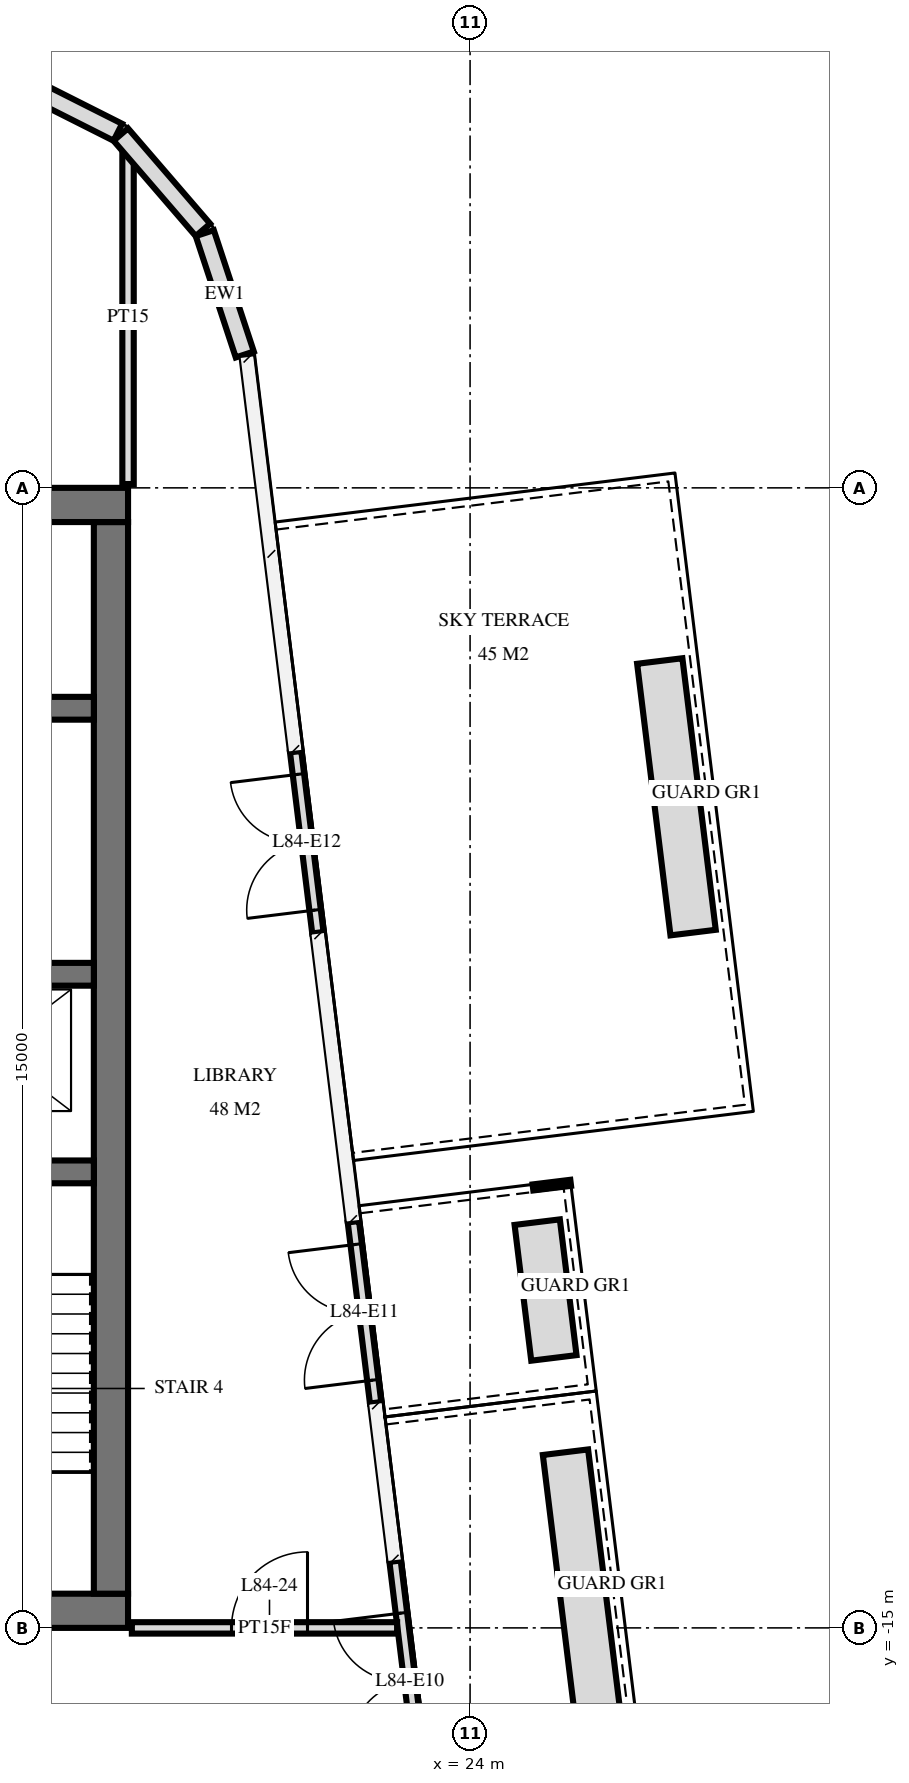
"""IFC4 building model, lengths in metres.
Left out: names, types, materials, properties, quantities, classifications, styles, units other than length and angle.
Written with IfcOpenShell. Run it as: python <this file> out.ifc"""

import sys

from ifc_helpers import new_model, si_unit, direction, frame, frame_2d, origin, place, context, subcontext, project, spatial, rectangle, extrude, element, fill, save


model = new_model("IFC4")
c1 = context("Model", 3, precision=1e-05, world=origin(), true_north=direction((0.0, 1.0)))
c2 = subcontext(c1, "Body", "Model", "MODEL_VIEW")
j1 = project(units=[si_unit("LENGTHUNIT", "METRE"), si_unit("PLANEANGLEUNIT", "RADIAN")], contexts=[c1])
p1 = place(None, origin())
s1 = spatial("IfcSite", under=j1, at=p1, CompositionType="ELEMENT")
p2 = place(p1, origin())
s2 = spatial("IfcBuilding", under=s1, at=p2, CompositionType="ELEMENT")
p3 = place(p2, frame((0.0, 0.0, 318.6)))
s3 = spatial("IfcBuildingStorey", under=s2, at=p3, CompositionType="ELEMENT", Elevation=318.6)
p4 = place(p3, frame((10.0, -0.225, 0.0), z_axis=(0.0, 0.0, 1.0), x_axis=(1.0, 0.0, 0.0)))
e1 = element("IfcWall", 1, at=p4, inside=s3, PredefinedType="SHEAR", context=c2, shape_type="SweptSolid", body=[
    extrude(rectangle(XDim=9.5, YDim=0.45, at=frame_2d((4.75, 0.0))), origin(), (0.0, 0.0, 1.0), 4.0),
])
p5 = place(p3, frame((10.0, -14.775, 0.0), z_axis=(0.0, 0.0, 1.0), x_axis=(1.0, 0.0, 0.0)))
e2 = element("IfcWall", 2, at=p5, inside=s3, PredefinedType="SHEAR", context=c2, shape_type="SweptSolid", body=[
    extrude(rectangle(XDim=9.5, YDim=0.45, at=frame_2d((4.75, 0.0))), origin(), (0.0, 0.0, 1.0), 4.0),
])
p6 = place(p5, frame((7.1, 0.0, 0.0)))
e3 = element("IfcOpeningElement", 3, at=p6, cuts=e2, PredefinedType="OPENING", context=c2, shape_type="SweptSolid", body=[
    extrude(rectangle(XDim=1.2, YDim=2.1, at=frame_2d((0.6, 1.05))), frame((0.0, 0.235, 0.0), z_axis=(0.0, -1.0, 0.0), x_axis=(1.0, 0.0, 0.0)), (0.0, 0.0, 1.0), 0.47),
])
p7 = place(p5, frame((4.15, 0.0, 0.0)))
e4 = element("IfcOpeningElement", 4, at=p7, cuts=e2, PredefinedType="OPENING", context=c2, shape_type="SweptSolid", body=[
    extrude(rectangle(XDim=1.1, YDim=2.1, at=frame_2d((0.55, 1.05))), frame((0.0, 0.235, 0.0), z_axis=(0.0, -1.0, 0.0), x_axis=(1.0, 0.0, 0.0)), (0.0, 0.0, 1.0), 0.47),
])
p8 = place(p3, frame((19.275, -14.55, 0.0), z_axis=(0.0, 0.0, 1.0), x_axis=(0.0, 1.0, 0.0)))
e5 = element("IfcWall", 5, at=p8, inside=s3, PredefinedType="SHEAR", context=c2, shape_type="SweptSolid", body=[
    extrude(rectangle(XDim=14.1, YDim=0.45, at=frame_2d((7.05, 0.0))), origin(), (0.0, 0.0, 1.0), 4.0),
])
p9 = place(p3, frame((10.35, -2.9, 0.0), z_axis=(0.0, 0.0, 1.0), x_axis=(1.0, 0.0, 0.0)))
e6 = element("IfcWall", 6, at=p9, inside=s3, PredefinedType="SHEAR", context=c2, shape_type="SweptSolid", body=[
    extrude(rectangle(XDim=8.7, YDim=0.3, at=frame_2d((4.35, 0.0))), origin(), (0.0, 0.0, 1.0), 4.0),
])
p10 = place(p9, frame((0.8, 0.0, 0.0)))
e7 = element("IfcOpeningElement", 7, at=p10, cuts=e6, PredefinedType="OPENING", context=c2, shape_type="SweptSolid", body=[
    extrude(rectangle(XDim=1.1, YDim=2.1, at=frame_2d((0.55, 1.05))), frame((0.0, 0.16, 0.0), z_axis=(0.0, -1.0, 0.0), x_axis=(1.0, 0.0, 0.0)), (0.0, 0.0, 1.0), 0.32),
])
p11 = place(p9, frame((3.8, 0.0, 0.0)))
e8 = element("IfcOpeningElement", 8, at=p11, cuts=e6, PredefinedType="OPENING", context=c2, shape_type="SweptSolid", body=[
    extrude(rectangle(XDim=1.1, YDim=2.1, at=frame_2d((0.55, 1.05))), frame((0.0, 0.16, 0.0), z_axis=(0.0, -1.0, 0.0), x_axis=(1.0, 0.0, 0.0)), (0.0, 0.0, 1.0), 0.32),
])
p12 = place(p9, frame((6.9, 0.0, 0.0)))
e9 = element("IfcOpeningElement", 9, at=p12, cuts=e6, PredefinedType="OPENING", context=c2, shape_type="SweptSolid", body=[
    extrude(rectangle(XDim=0.9, YDim=2.1, at=frame_2d((0.45, 1.05))), frame((0.0, 0.16, 0.0), z_axis=(0.0, -1.0, 0.0), x_axis=(1.0, 0.0, 0.0)), (0.0, 0.0, 1.0), 0.32),
])
p13 = place(p3, frame((10.35, -6.4, 0.0), z_axis=(0.0, 0.0, 1.0), x_axis=(1.0, 0.0, 0.0)))
e10 = element("IfcWall", 10, at=p13, inside=s3, PredefinedType="SHEAR", context=c2, shape_type="SweptSolid", body=[
    extrude(rectangle(XDim=8.7, YDim=0.3, at=frame_2d((4.35, 0.0))), origin(), (0.0, 0.0, 1.0), 4.0),
])
p14 = place(p13, frame((6.8, 0.0, 0.0)))
e11 = element("IfcOpeningElement", 11, at=p14, cuts=e10, PredefinedType="OPENING", context=c2, shape_type="SweptSolid", body=[
    extrude(rectangle(XDim=1.1, YDim=2.1, at=frame_2d((0.55, 1.05))), frame((0.0, 0.16, 0.0), z_axis=(0.0, -1.0, 0.0), x_axis=(1.0, 0.0, 0.0)), (0.0, 0.0, 1.0), 0.32),
])
p15 = place(p3, frame((10.35, -9.0, 0.0), z_axis=(0.0, 0.0, 1.0), x_axis=(1.0, 0.0, 0.0)))
e12 = element("IfcWall", 12, at=p15, inside=s3, PredefinedType="SHEAR", context=c2, shape_type="SweptSolid", body=[
    extrude(rectangle(XDim=8.7, YDim=0.3, at=frame_2d((4.35, 0.0))), origin(), (0.0, 0.0, 1.0), 4.0),
])
p16 = place(p15, frame((3.8, 0.0, 0.0)))
e13 = element("IfcOpeningElement", 13, at=p16, cuts=e12, PredefinedType="OPENING", context=c2, shape_type="SweptSolid", body=[
    extrude(rectangle(XDim=1.1, YDim=2.1, at=frame_2d((0.55, 1.05))), frame((0.0, 0.16, 0.0), z_axis=(0.0, -1.0, 0.0), x_axis=(1.0, 0.0, 0.0)), (0.0, 0.0, 1.0), 0.32),
])
p17 = place(p3, frame((21.036, 1.755, 0.0), z_axis=(0.0, 0.0, 1.0), x_axis=(-0.313046160822, 0.949737911844, 0.0)))
e14 = element("IfcWall", 14, at=p17, inside=s3, PredefinedType="SOLIDWALL", context=c2, shape_type="SweptSolid", body=[
    extrude(rectangle(XDim=1.681, YDim=0.25, at=frame_2d((0.841, 0.0))), origin(), (0.0, 0.0, 1.0), 3.72),
])
for number, where, z_axis, x_axis in (
    (15, (20.485, 3.394, 0.0), (0.0, 0.0, 1.0), (-0.653, 0.758, 0.0)),
    (16, (19.366, 4.679, 0.0), (0.0, 0.0, 1.0), (-0.893, 0.45, 0.0)),
):
    element("IfcWall", number, at=place(p3, frame(where, z_axis=z_axis, x_axis=x_axis)), inside=s3, PredefinedType="SOLIDWALL", context=c2, shape_type="SweptSolid", body=[
        extrude(rectangle(XDim=1.656, YDim=0.25, at=frame_2d((0.828, 0.0))), origin(), (0.0, 0.0, 1.0), 3.72),
    ])
p18 = place(p3, frame((23.4, -17.274, 0.0), z_axis=(0.0, 0.0, 1.0), x_axis=(-0.121858082248, 0.992547534273, 0.0)))
e17 = element("IfcWall", 17, at=p18, inside=s3, PredefinedType="USERDEFINED", context=c2, shape_type="SweptSolid", body=[
    extrude(rectangle(XDim=3.176, YDim=0.15, at=frame_2d((1.588, 0.0))), origin(), (0.0, 0.0, 1.0), 3.72),
])
p19 = place(p18, frame((0.688, 0.0, 0.0)))
e18 = element("IfcOpeningElement", 18, at=p19, cuts=e17, PredefinedType="OPENING", context=c2, shape_type="SweptSolid", body=[
    extrude(rectangle(XDim=1.8, YDim=2.4, at=frame_2d((0.9, 1.2))), frame((0.0, 0.085, 0.0), z_axis=(0.0, -1.0, 0.0), x_axis=(1.0, 0.0, 0.0)), (0.0, 0.0, 1.0), 0.17),
])
p20 = place(p3, frame((22.757, -12.038, 0.0), z_axis=(0.0, 0.0, 1.0), x_axis=(-0.121868445399, 0.992546261902, 0.0)))
e19 = element("IfcWall", 19, at=p20, inside=s3, PredefinedType="USERDEFINED", context=c2, shape_type="SweptSolid", body=[
    extrude(rectangle(XDim=2.4, YDim=0.15, at=frame_2d((1.2, 0.0))), origin(), (0.0, 0.0, 1.0), 3.72),
])
p21 = place(p20, frame((0.3, 0.0, 0.0)))
e20 = element("IfcOpeningElement", 20, at=p21, cuts=e19, PredefinedType="OPENING", context=c2, shape_type="SweptSolid", body=[
    extrude(rectangle(XDim=1.8, YDim=2.4, at=frame_2d((0.9, 1.2))), frame((0.0, 0.085, 0.0), z_axis=(0.0, -1.0, 0.0), x_axis=(1.0, 0.0, 0.0)), (0.0, 0.0, 1.0), 0.17),
])
p22 = place(p3, frame((21.998, -5.853, 0.0), z_axis=(0.0, 0.0, 1.0), x_axis=(-0.121868445399, 0.992546261902, 0.0)))
e21 = element("IfcWall", 21, at=p22, inside=s3, PredefinedType="USERDEFINED", context=c2, shape_type="SweptSolid", body=[
    extrude(rectangle(XDim=2.4, YDim=0.15, at=frame_2d((1.2, 0.0))), origin(), (0.0, 0.0, 1.0), 3.72),
])
p23 = place(p22, frame((0.3, 0.0, 0.0)))
e22 = element("IfcOpeningElement", 22, at=p23, cuts=e21, PredefinedType="OPENING", context=c2, shape_type="SweptSolid", body=[
    extrude(rectangle(XDim=1.8, YDim=2.4, at=frame_2d((0.9, 1.2))), frame((0.0, 0.085, 0.0), z_axis=(0.0, -1.0, 0.0), x_axis=(1.0, 0.0, 0.0)), (0.0, 0.0, 1.0), 0.17),
])
p24 = place(p3, frame((25.255, -12.688, 0.0), z_axis=(0.0, 0.0, 1.0), x_axis=(0.121864343918, -0.992546765488, 0.0)))
e23 = element("IfcWall", 23, at=p24, inside=s3, PredefinedType="USERDEFINED", context=c2, shape_type="SweptSolid", body=[
    extrude(rectangle(XDim=3.6, YDim=0.6, at=frame_2d((1.8, 0.0))), origin(), (0.0, 0.0, 1.0), 0.65),
])
p25 = place(p3, frame((24.883, -9.662, 0.0), z_axis=(0.0, 0.0, 1.0), x_axis=(0.121830336845, -0.992550940267, 0.0)))
e24 = element("IfcWall", 24, at=p25, inside=s3, PredefinedType="USERDEFINED", context=c2, shape_type="SweptSolid", body=[
    extrude(rectangle(XDim=1.8, YDim=0.6, at=frame_2d((0.9, 0.0))), origin(), (0.0, 0.0, 1.0), 0.65),
])
p26 = place(p3, frame((26.496, -2.278, 0.0), z_axis=(0.0, 0.0, 1.0), x_axis=(0.121864343918, -0.992546765488, 0.0)))
e25 = element("IfcWall", 25, at=p26, inside=s3, PredefinedType="USERDEFINED", context=c2, shape_type="SweptSolid", body=[
    extrude(rectangle(XDim=3.6, YDim=0.6, at=frame_2d((1.8, 0.0))), origin(), (0.0, 0.0, 1.0), 0.65),
])
p27 = place(p3, frame((19.5, 0.05, 0.0), z_axis=(0.0, 0.0, 1.0), x_axis=(0.0, 1.0, 0.0)))
e26 = element("IfcWall", 26, at=p27, inside=s3, PredefinedType="PARTITIONING", context=c2, shape_type="SweptSolid", body=[
    extrude(rectangle(XDim=4.403, YDim=0.15, at=frame_2d((2.202, 0.0))), origin(), (0.0, 0.0, 1.0), 3.72),
])
p28 = place(p3, frame((19.55, -15.0, 0.0), z_axis=(0.0, 0.0, 1.0), x_axis=(1.0, 0.0, 0.0)))
e27 = element("IfcWall", 27, at=p28, inside=s3, PredefinedType="PARTITIONING", context=c2, shape_type="SweptSolid", body=[
    extrude(rectangle(XDim=3.49, YDim=0.15, at=frame_2d((1.745, 0.0))), origin(), (0.0, 0.0, 1.0), 3.72),
])
p29 = place(p28, frame((1.311, 0.0, 0.0)))
e28 = element("IfcOpeningElement", 28, at=p29, cuts=e27, PredefinedType="OPENING", context=c2, shape_type="SweptSolid", body=[
    extrude(rectangle(XDim=1.0, YDim=2.1, at=frame_2d((0.5, 1.05))), frame((0.0, 0.085, 0.0), z_axis=(0.0, -1.0, 0.0), x_axis=(1.0, 0.0, 0.0)), (0.0, 0.0, 1.0), 0.17),
])
p30 = place(p19, origin())
e29 = element("IfcDoor", 29, at=p30, inside=s3, OperationType="DOUBLE_DOOR_SINGLE_SWING", PredefinedType="DOOR", context=c2, shape_type="SweptSolid", body=[
    extrude(rectangle(XDim=1.8, YDim=2.4, at=frame_2d((0.9, 1.2))), frame((0.0, 0.025, 0.0), z_axis=(0.0, -1.0, 0.0), x_axis=(1.0, 0.0, 0.0)), (0.0, 0.0, 1.0), 0.05),
])
fill(e18, e29)
p31 = place(p21, origin())
e30 = element("IfcDoor", 30, at=p31, inside=s3, OperationType="DOUBLE_DOOR_SINGLE_SWING", PredefinedType="DOOR", context=c2, shape_type="SweptSolid", body=[
    extrude(rectangle(XDim=1.8, YDim=2.4, at=frame_2d((0.9, 1.2))), frame((0.0, 0.025, 0.0), z_axis=(0.0, -1.0, 0.0), x_axis=(1.0, 0.0, 0.0)), (0.0, 0.0, 1.0), 0.05),
])
fill(e20, e30)
p32 = place(p23, origin())
e31 = element("IfcDoor", 31, at=p32, inside=s3, OperationType="DOUBLE_DOOR_SINGLE_SWING", PredefinedType="DOOR", context=c2, shape_type="SweptSolid", body=[
    extrude(rectangle(XDim=1.8, YDim=2.4, at=frame_2d((0.9, 1.2))), frame((0.0, 0.025, 0.0), z_axis=(0.0, -1.0, 0.0), x_axis=(1.0, 0.0, 0.0)), (0.0, 0.0, 1.0), 0.05),
])
fill(e22, e31)
p33 = place(p29, origin())
e32 = element("IfcDoor", 32, at=p33, inside=s3, OperationType="SINGLE_SWING_LEFT", PredefinedType="DOOR", context=c2, shape_type="SweptSolid", body=[
    extrude(rectangle(XDim=1.0, YDim=2.1, at=frame_2d((0.5, 1.05))), frame((0.0, 0.025, 0.0), z_axis=(0.0, -1.0, 0.0), x_axis=(1.0, 0.0, 0.0)), (0.0, 0.0, 1.0), 0.05),
])
fill(e28, e32)
save(model, sys.argv[1])
